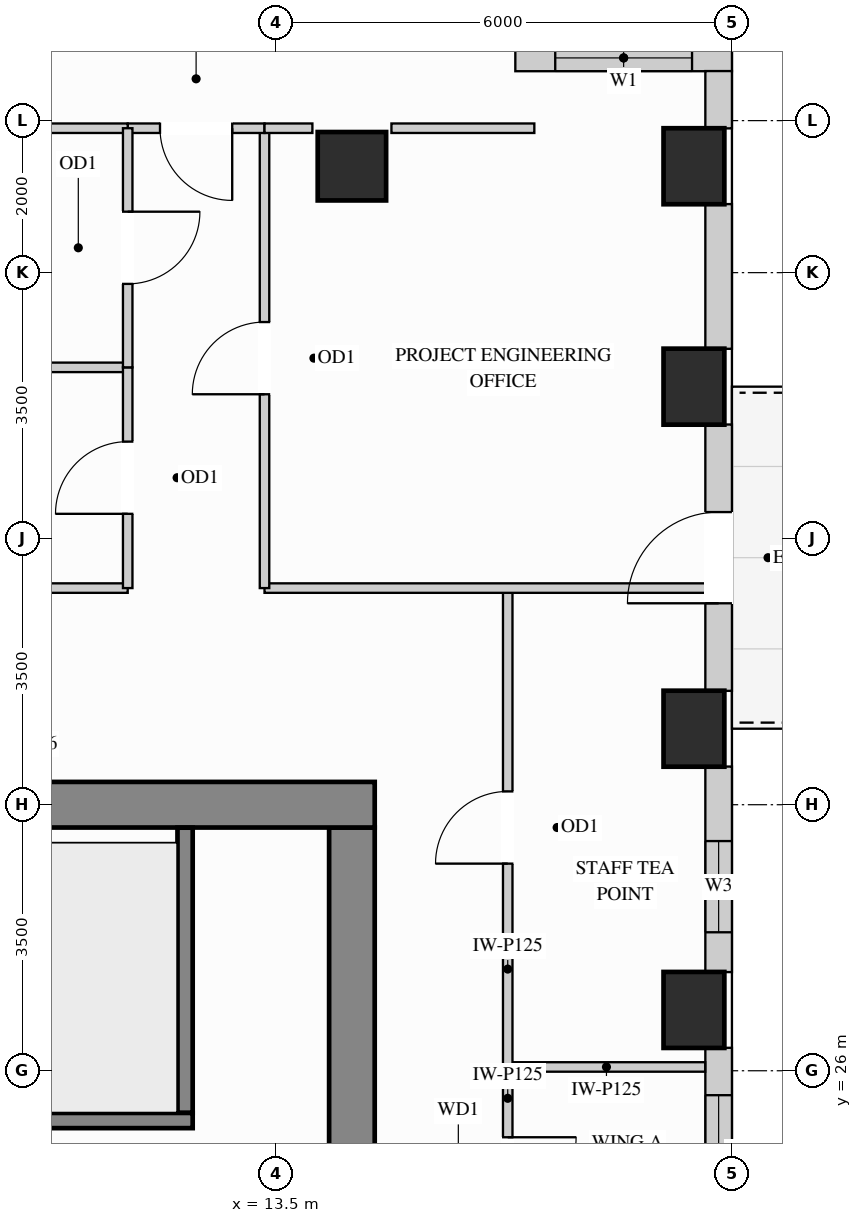
"""IFC4 building model, lengths in metres.
Left out: names, types, materials, properties, quantities, classifications, styles, units other than length and angle.
Written with IfcOpenShell. Run it as: python <this file> out.ifc"""

import sys

from ifc_helpers import new_model, si_unit, direction, frame, frame_2d, origin, origin_2d, place, context, subcontext, project, spatial, rectangle, extrude, source, transform, mapped, element, fill, save


model = new_model("IFC4")
c1 = context("Model", 3, precision=1e-05, world=origin(), true_north=direction((0.0, 1.0)))
c2 = subcontext(c1, "Body", "Model", "MODEL_VIEW")
j1 = project(units=[si_unit("LENGTHUNIT", "METRE"), si_unit("PLANEANGLEUNIT", "RADIAN")], contexts=[c1])
p1 = place(None, origin())
s1 = spatial("IfcSite", under=j1, at=p1, CompositionType="ELEMENT")
p2 = place(p1, origin())
s2 = spatial("IfcBuilding", under=s1, at=p2, CompositionType="ELEMENT")
p3 = place(p2, frame((0.0, 0.0, 171.9)))
s3 = spatial("IfcBuildingStorey", under=s2, at=p3, CompositionType="ELEMENT", Elevation=171.9)
m1 = source(origin(), c2, "Body", "SweptSolid", [
    extrude(rectangle(XDim=0.9, YDim=0.9, at=origin_2d()), origin(), (0.0, 0.0, 1.0), 3.4),
])
p4 = place(p3, frame((14.5, 37.9, 0.0), z_axis=(0.0, 0.0, 1.0), x_axis=(1.0, 0.0, 0.0)))
e1 = element("IfcColumn", 1, at=p4, inside=s3, PredefinedType="COLUMN", context=c2, shape_type="MappedRepresentation", body=[
    mapped(m1, transform((0.0, 0.0, 0.0), x_axis=(1.0, 0.0, 0.0), y_axis=(0.0, 1.0, 0.0), z_axis=(0.0, 0.0, 1.0))),
])
m2 = source(origin(), c2, "Body", "SweptSolid", [
    extrude(rectangle(XDim=0.8, YDim=1.0, at=origin_2d()), origin(), (0.0, 0.0, 1.0), 3.4),
])
for number, where, z_axis, x_axis in (
    (2, (19.0, 26.8, 0.0), (0.0, 0.0, 1.0), (1.0, 0.0, 0.0)),
    (3, (19.0, 30.5, 0.0), (0.0, 0.0, 1.0), (1.0, 0.0, 0.0)),
    (4, (19.0, 35.0, 0.0), (0.0, 0.0, 1.0), (1.0, 0.0, 0.0)),
    (5, (19.0, 37.9, 0.0), (0.0, 0.0, 1.0), (1.0, 0.0, 0.0)),
):
    element("IfcColumn", number, at=place(p3, frame(where, z_axis=z_axis, x_axis=x_axis)), inside=s3, PredefinedType="COLUMN", context=c2, shape_type="MappedRepresentation", body=[
        mapped(m2, transform((0.0, 0.0, 0.0), x_axis=(1.0, 0.0, 0.0), y_axis=(0.0, 1.0, 0.0), z_axis=(0.0, 0.0, 1.0))),
    ])
m3 = source(origin(), c2, "Body", "SweptSolid", [
    extrude(rectangle(XDim=8.32, YDim=0.6, at=frame_2d((4.16, 0.0))), origin(), (0.0, 0.0, 1.0), 3.4),
])
p5 = place(p3, frame((14.5, 20.88, 0.0), z_axis=(0.0, 0.0, 1.0), x_axis=(0.0, 1.0, 0.0)))
e6 = element("IfcWall", 6, at=p5, inside=s3, PredefinedType="SHEAR", context=c2, shape_type="MappedRepresentation", body=[
    mapped(m3, transform((0.0, 0.0, 0.0), x_axis=(1.0, 0.0, 0.0), y_axis=(0.0, 1.0, 0.0), z_axis=(0.0, 0.0, 1.0))),
])
m4 = source(origin(), c2, "Body", "SweptSolid", [
    extrude(rectangle(XDim=10.6, YDim=0.6, at=frame_2d((5.3, 0.0))), origin(), (0.0, 0.0, 1.0), 3.4),
])
p6 = place(p3, frame((4.2, 29.5, 0.0), z_axis=(0.0, 0.0, 1.0), x_axis=(1.0, 0.0, 0.0)))
e7 = element("IfcWall", 7, at=p6, inside=s3, PredefinedType="SHEAR", context=c2, shape_type="MappedRepresentation", body=[
    mapped(m4, transform((0.0, 0.0, 0.0), x_axis=(1.0, 0.0, 0.0), y_axis=(0.0, 1.0, 0.0), z_axis=(0.0, 0.0, 1.0))),
])
p7 = place(p3, frame((19.5, 39.325, 0.0), z_axis=(0.0, 0.0, 1.0), x_axis=(-1.0, 0.0, 0.0)))
e8 = element("IfcWall", 8, at=p7, inside=s3, PredefinedType="SOLIDWALL", context=c2, shape_type="SweptSolid", body=[
    extrude(rectangle(XDim=2.85, YDim=0.35, at=frame_2d((1.425, 0.0))), origin(), (0.0, 0.0, 1.0), 3.385),
])
p8 = place(p7, frame((0.525, 0.0, 0.78)))
e9 = element("IfcOpeningElement", 9, at=p8, cuts=e8, PredefinedType="OPENING", context=c2, shape_type="SweptSolid", body=[
    extrude(rectangle(XDim=1.8, YDim=2.1, at=frame_2d((0.9, 1.05))), frame((0.0, 0.185, 0.0), z_axis=(0.0, -1.0, 0.0), x_axis=(1.0, 0.0, 0.0)), (0.0, 0.0, 1.0), 0.37),
])
p9 = place(p3, frame((19.325, 22.998, 0.0), z_axis=(0.0, 0.0, 1.0), x_axis=(0.0, 1.0, 0.0)))
e10 = element("IfcWall", 10, at=p9, inside=s3, PredefinedType="SOLIDWALL", context=c2, shape_type="SweptSolid", body=[
    extrude(rectangle(XDim=3.304, YDim=0.35, at=frame_2d((1.652, 0.0))), origin(), (0.0, 0.0, 1.0), 2.612),
])
p10 = place(p9, frame((1.18, 0.0, 0.78)))
e11 = element("IfcOpeningElement", 11, at=p10, cuts=e10, PredefinedType="OPENING", context=c2, shape_type="SweptSolid", body=[
    extrude(rectangle(XDim=1.5, YDim=1.652, at=frame_2d((0.75, 0.826))), frame((0.0, 0.185, 0.0), z_axis=(0.0, -1.0, 0.0), x_axis=(1.0, 0.0, 0.0)), (0.0, 0.0, 1.0), 0.37),
])
p11 = place(p3, frame((19.325, 27.298, 0.0), z_axis=(0.0, 0.0, 1.0), x_axis=(0.0, 1.0, 0.0)))
e12 = element("IfcWall", 12, at=p11, inside=s3, PredefinedType="SOLIDWALL", context=c2, shape_type="SweptSolid", body=[
    extrude(rectangle(XDim=2.704, YDim=0.35, at=frame_2d((1.352, 0.0))), origin(), (0.0, 0.0, 1.0), 2.612),
])
p12 = place(p11, frame((0.524, 0.0, 0.78)))
e13 = element("IfcOpeningElement", 13, at=p12, cuts=e12, PredefinedType="OPENING", context=c2, shape_type="SweptSolid", body=[
    extrude(rectangle(XDim=1.2, YDim=1.652, at=frame_2d((0.6, 0.826))), frame((0.0, 0.185, 0.0), z_axis=(0.0, -1.0, 0.0), x_axis=(1.0, 0.0, 0.0)), (0.0, 0.0, 1.0), 0.37),
])
p13 = place(p3, frame((19.325, 30.998, 0.0), z_axis=(0.0, 0.0, 1.0), x_axis=(0.0, 1.0, 0.0)))
e14 = element("IfcWall", 14, at=p13, inside=s3, PredefinedType="SOLIDWALL", context=c2, shape_type="SweptSolid", body=[
    extrude(rectangle(XDim=3.504, YDim=0.35, at=frame_2d((1.752, 0.0))), origin(), (0.0, 0.0, 1.0), 2.612),
])
p14 = place(p13, frame((1.152, 0.0, 0.0)))
e15 = element("IfcOpeningElement", 15, at=p14, cuts=e14, PredefinedType="OPENING", context=c2, shape_type="SweptSolid", body=[
    extrude(rectangle(XDim=1.2, YDim=2.15, at=frame_2d((0.6, 1.075))), frame((0.0, 0.185, 0.0), z_axis=(0.0, -1.0, 0.0), x_axis=(1.0, 0.0, 0.0)), (0.0, 0.0, 1.0), 0.37),
])
m5 = source(origin(), c2, "Body", "SweptSolid", [
    extrude(rectangle(XDim=1.904, YDim=0.35, at=frame_2d((0.952, 0.0))), origin(), (0.0, 0.0, 1.0), 2.612),
])
p15 = place(p3, frame((19.325, 35.498, 0.0), z_axis=(0.0, 0.0, 1.0), x_axis=(0.0, 1.0, 0.0)))
e16 = element("IfcWall", 16, at=p15, inside=s3, PredefinedType="SOLIDWALL", context=c2, shape_type="MappedRepresentation", body=[
    mapped(m5, transform((0.0, 0.0, 0.0), x_axis=(1.0, 0.0, 0.0), y_axis=(0.0, 1.0, 0.0), z_axis=(0.0, 0.0, 1.0))),
])
m6 = source(origin(), c2, "Body", "SweptSolid", [
    extrude(rectangle(XDim=0.754, YDim=0.35, at=frame_2d((0.377, 0.0))), origin(), (0.0, 0.0, 1.0), 3.385),
])
p16 = place(p3, frame((19.325, 38.398, 0.0), z_axis=(0.0, 0.0, 1.0), x_axis=(0.0, 1.0, 0.0)))
e17 = element("IfcWall", 17, at=p16, inside=s3, PredefinedType="SOLIDWALL", context=c2, shape_type="MappedRepresentation", body=[
    mapped(m6, transform((0.0, 0.0, 0.0), x_axis=(1.0, 0.0, 0.0), y_axis=(0.0, 1.0, 0.0), z_axis=(0.0, 0.0, 1.0))),
])
m7 = source(origin(), c2, "Body", "SweptSolid", [
    extrude(rectangle(XDim=2.598, YDim=0.125, at=frame_2d((1.299, 0.0))), origin(), (0.0, 0.0, 1.0), 3.385),
])
p17 = place(p3, frame((16.55, 26.05, 0.0), z_axis=(0.0, 0.0, 1.0), x_axis=(1.0, 0.0, 0.0)))
e18 = element("IfcWall", 18, at=p17, inside=s3, PredefinedType="PARTITIONING", context=c2, shape_type="MappedRepresentation", body=[
    mapped(m7, transform((0.0, 0.0, 0.0), x_axis=(1.0, 0.0, 0.0), y_axis=(0.0, 1.0, 0.0), z_axis=(0.0, 0.0, 1.0))),
])
p18 = place(p3, frame((16.55, 26.05, 0.0), z_axis=(0.0, 0.0, 1.0), x_axis=(0.0, 1.0, 0.0)))
e19 = element("IfcWall", 19, at=p18, inside=s3, PredefinedType="PARTITIONING", context=c2, shape_type="SweptSolid", body=[
    extrude(rectangle(XDim=6.3, YDim=0.125, at=frame_2d((3.15, 0.0))), origin(), (0.0, 0.0, 1.0), 3.385),
])
p19 = place(p18, frame((2.675, 0.0, 0.0)))
e20 = element("IfcOpeningElement", 20, at=p19, cuts=e19, PredefinedType="OPENING", context=c2, shape_type="SweptSolid", body=[
    extrude(rectangle(XDim=0.95, YDim=2.15, at=frame_2d((0.475, 1.075))), frame((0.0, 0.073, 0.0), z_axis=(0.0, -1.0, 0.0), x_axis=(1.0, 0.0, 0.0)), (0.0, 0.0, 1.0), 0.145),
])
p20 = place(p3, frame((16.55, 23.35, 0.0), z_axis=(0.0, 0.0, 1.0), x_axis=(0.0, 1.0, 0.0)))
e21 = element("IfcWall", 21, at=p20, inside=s3, PredefinedType="PARTITIONING", context=c2, shape_type="SweptSolid", body=[
    extrude(rectangle(XDim=2.7, YDim=0.125, at=frame_2d((1.35, 0.0))), origin(), (0.0, 0.0, 1.0), 3.385),
])
p21 = place(p20, frame((0.875, 0.0, 0.0)))
e22 = element("IfcOpeningElement", 22, at=p21, cuts=e21, PredefinedType="OPENING", context=c2, shape_type="SweptSolid", body=[
    extrude(rectangle(XDim=0.9, YDim=2.15, at=frame_2d((0.45, 1.075))), frame((0.0, 0.073, 0.0), z_axis=(0.0, -1.0, 0.0), x_axis=(1.0, 0.0, 0.0)), (0.0, 0.0, 1.0), 0.145),
])
m8 = source(origin(), c2, "Body", "SweptSolid", [
    extrude(rectangle(XDim=5.798, YDim=0.125, at=frame_2d((2.899, 0.0))), origin(), (0.0, 0.0, 1.0), 3.385),
])
p22 = place(p3, frame((13.35, 32.35, 0.0), z_axis=(0.0, 0.0, 1.0), x_axis=(1.0, 0.0, 0.0)))
e23 = element("IfcWall", 23, at=p22, inside=s3, PredefinedType="PARTITIONING", context=c2, shape_type="MappedRepresentation", body=[
    mapped(m8, transform((0.0, 0.0, 0.0), x_axis=(1.0, 0.0, 0.0), y_axis=(0.0, 1.0, 0.0), z_axis=(0.0, 0.0, 1.0))),
])
m9 = source(origin(), c2, "Body", "SweptSolid", [
    extrude(rectangle(XDim=11.198, YDim=0.125, at=frame_2d((5.599, 0.0))), origin(), (0.0, 0.0, 1.0), 3.385),
])
p23 = place(p3, frame((0.352, 32.35, 0.0), z_axis=(0.0, 0.0, 1.0), x_axis=(1.0, 0.0, 0.0)))
e24 = element("IfcWall", 24, at=p23, inside=s3, PredefinedType="PARTITIONING", context=c2, shape_type="MappedRepresentation", body=[
    mapped(m9, transform((0.0, 0.0, 0.0), x_axis=(1.0, 0.0, 0.0), y_axis=(0.0, 1.0, 0.0), z_axis=(0.0, 0.0, 1.0))),
])
m10 = source(origin(), c2, "Body", "SweptSolid", [
    extrude(rectangle(XDim=10.43, YDim=0.125, at=frame_2d((5.215, 0.0))), origin(), (0.0, 0.0, 1.0), 3.385),
])
p24 = place(p3, frame((1.12, 35.254, 0.0), z_axis=(0.0, 0.0, 1.0), x_axis=(1.0, 0.0, 0.0)))
e25 = element("IfcWall", 25, at=p24, inside=s3, PredefinedType="PARTITIONING", context=c2, shape_type="MappedRepresentation", body=[
    mapped(m10, transform((0.0, 0.0, 0.0), x_axis=(1.0, 0.0, 0.0), y_axis=(0.0, 1.0, 0.0), z_axis=(0.0, 0.0, 1.0))),
])
p25 = place(p3, frame((13.35, 32.35, 0.0), z_axis=(0.0, 0.0, 1.0), x_axis=(0.0, 1.0, 0.0)))
e26 = element("IfcWall", 26, at=p25, inside=s3, PredefinedType="PARTITIONING", context=c2, shape_type="SweptSolid", body=[
    extrude(rectangle(XDim=6.05, YDim=0.125, at=frame_2d((3.025, 0.0))), origin(), (0.0, 0.0, 1.0), 3.385),
])
p26 = place(p25, frame((2.55, 0.0, 0.0)))
e27 = element("IfcOpeningElement", 27, at=p26, cuts=e26, PredefinedType="OPENING", context=c2, shape_type="SweptSolid", body=[
    extrude(rectangle(XDim=0.95, YDim=2.15, at=frame_2d((0.475, 1.075))), frame((0.0, 0.073, 0.0), z_axis=(0.0, -1.0, 0.0), x_axis=(1.0, 0.0, 0.0)), (0.0, 0.0, 1.0), 0.145),
])
p27 = place(p3, frame((11.55, 38.4, 0.0), z_axis=(0.0, 0.0, 1.0), x_axis=(1.0, 0.0, 0.0)))
e28 = element("IfcWall", 28, at=p27, inside=s3, PredefinedType="PARTITIONING", context=c2, shape_type="SweptSolid", body=[
    extrude(rectangle(XDim=1.8, YDim=0.125, at=frame_2d((0.9, 0.0))), origin(), (0.0, 0.0, 1.0), 3.385),
])
p28 = place(p27, frame((0.425, 0.0, 0.0)))
e29 = element("IfcOpeningElement", 29, at=p28, cuts=e28, PredefinedType="OPENING", context=c2, shape_type="SweptSolid", body=[
    extrude(rectangle(XDim=0.95, YDim=2.15, at=frame_2d((0.475, 1.075))), frame((0.0, 0.073, 0.0), z_axis=(0.0, -1.0, 0.0), x_axis=(1.0, 0.0, 0.0)), (0.0, 0.0, 1.0), 0.145),
])
m11 = source(origin(), c2, "Body", "SweptSolid", [
    extrude(rectangle(XDim=0.63, YDim=0.125, at=frame_2d((0.315, 0.0))), origin(), (0.0, 0.0, 1.0), 3.385),
])
p29 = place(p3, frame((13.35, 38.4, 0.0), z_axis=(0.0, 0.0, 1.0), x_axis=(1.0, 0.0, 0.0)))
e30 = element("IfcWall", 30, at=p29, inside=s3, PredefinedType="PARTITIONING", context=c2, shape_type="MappedRepresentation", body=[
    mapped(m11, transform((0.0, 0.0, 0.0), x_axis=(1.0, 0.0, 0.0), y_axis=(0.0, 1.0, 0.0), z_axis=(0.0, 0.0, 1.0))),
])
m12 = source(origin(), c2, "Body", "SweptSolid", [
    extrude(rectangle(XDim=1.88, YDim=0.125, at=frame_2d((0.94, 0.0))), origin(), (0.0, 0.0, 1.0), 3.385),
])
p30 = place(p3, frame((15.02, 38.4, 0.0), z_axis=(0.0, 0.0, 1.0), x_axis=(1.0, 0.0, 0.0)))
e31 = element("IfcWall", 31, at=p30, inside=s3, PredefinedType="PARTITIONING", context=c2, shape_type="MappedRepresentation", body=[
    mapped(m12, transform((0.0, 0.0, 0.0), x_axis=(1.0, 0.0, 0.0), y_axis=(0.0, 1.0, 0.0), z_axis=(0.0, 0.0, 1.0))),
])
m13 = source(origin(), c2, "Body", "SweptSolid", [
    extrude(rectangle(XDim=2.03, YDim=0.125, at=frame_2d((1.015, 0.0))), origin(), (0.0, 0.0, 1.0), 3.385),
])
p31 = place(p3, frame((9.52, 38.4, 0.0), z_axis=(0.0, 0.0, 1.0), x_axis=(1.0, 0.0, 0.0)))
e32 = element("IfcWall", 32, at=p31, inside=s3, PredefinedType="PARTITIONING", context=c2, shape_type="MappedRepresentation", body=[
    mapped(m13, transform((0.0, 0.0, 0.0), x_axis=(1.0, 0.0, 0.0), y_axis=(0.0, 1.0, 0.0), z_axis=(0.0, 0.0, 1.0))),
])
p32 = place(p3, frame((11.55, 32.35, 0.0), z_axis=(0.0, 0.0, 1.0), x_axis=(0.0, 1.0, 0.0)))
e33 = element("IfcWall", 33, at=p32, inside=s3, PredefinedType="PARTITIONING", context=c2, shape_type="SweptSolid", body=[
    extrude(rectangle(XDim=2.904, YDim=0.125, at=frame_2d((1.452, 0.0))), origin(), (0.0, 0.0, 1.0), 3.385),
])
p33 = place(p32, frame((0.977, 0.0, 0.0)))
e34 = element("IfcOpeningElement", 34, at=p33, cuts=e33, PredefinedType="OPENING", context=c2, shape_type="SweptSolid", body=[
    extrude(rectangle(XDim=0.95, YDim=2.15, at=frame_2d((0.475, 1.075))), frame((0.0, 0.073, 0.0), z_axis=(0.0, -1.0, 0.0), x_axis=(1.0, 0.0, 0.0)), (0.0, 0.0, 1.0), 0.145),
])
p34 = place(p3, frame((11.55, 35.254, 0.0), z_axis=(0.0, 0.0, 1.0), x_axis=(0.0, 1.0, 0.0)))
e35 = element("IfcWall", 35, at=p34, inside=s3, PredefinedType="PARTITIONING", context=c2, shape_type="SweptSolid", body=[
    extrude(rectangle(XDim=3.146, YDim=0.125, at=frame_2d((1.573, 0.0))), origin(), (0.0, 0.0, 1.0), 3.385),
])
p35 = place(p34, frame((1.098, 0.0, 0.0)))
e36 = element("IfcOpeningElement", 36, at=p35, cuts=e35, PredefinedType="OPENING", context=c2, shape_type="SweptSolid", body=[
    extrude(rectangle(XDim=0.95, YDim=2.15, at=frame_2d((0.475, 1.075))), frame((0.0, 0.073, 0.0), z_axis=(0.0, -1.0, 0.0), x_axis=(1.0, 0.0, 0.0)), (0.0, 0.0, 1.0), 0.145),
])
m14 = source(origin(), c2, "Body", "SweptSolid", [
    extrude(rectangle(XDim=3.753, YDim=0.2, at=frame_2d((1.876, 0.0))), origin(), (0.0, 0.0, 1.0), 3.4),
])
p36 = place(p3, frame((12.305, 25.445, 0.0), z_axis=(0.0, 0.0, 1.0), x_axis=(0.0, 1.0, 0.0)))
e37 = element("IfcWall", 37, at=p36, inside=s3, PredefinedType="SHEAR", context=c2, shape_type="MappedRepresentation", body=[
    mapped(m14, transform((0.0, 0.0, 0.0), x_axis=(1.0, 0.0, 0.0), y_axis=(0.0, 1.0, 0.0), z_axis=(0.0, 0.0, 1.0))),
])
p37 = place(p3, frame((4.802, 25.345, 0.0), z_axis=(0.0, 0.0, 1.0), x_axis=(1.0, 0.0, 0.0)))
e38 = element("IfcWall", 38, at=p37, inside=s3, PredefinedType="SHEAR", context=c2, shape_type="SweptSolid", body=[
    extrude(rectangle(XDim=7.603, YDim=0.2, at=frame_2d((3.802, 0.0))), origin(), (0.0, 0.0, 1.0), 3.4),
])
p38 = place(p37, frame((0.4, 0.0, 0.0)))
e39 = element("IfcOpeningElement", 39, at=p38, cuts=e38, PredefinedType="OPENING", context=c2, shape_type="SweptSolid", body=[
    extrude(rectangle(XDim=1.1, YDim=2.15, at=frame_2d((0.55, 1.075))), frame((0.0, 0.11, 0.0), z_axis=(0.0, -1.0, 0.0), x_axis=(1.0, 0.0, 0.0)), (0.0, 0.0, 1.0), 0.22),
])
m15 = source(origin(), c2, "Body", "SweptSolid", [
    extrude(rectangle(XDim=1.2, YDim=2.15, at=frame_2d((0.6, 1.075))), frame((0.0, 0.025, 0.0), z_axis=(0.0, -1.0, 0.0), x_axis=(1.0, 0.0, 0.0)), (0.0, 0.0, 1.0), 0.05),
])
p39 = place(p14, frame((1.2, 0.0, 0.0), z_axis=(0.0, 0.0, 1.0), x_axis=(-1.0, 0.0, 0.0)))
e40 = element("IfcDoor", 40, at=p39, inside=s3, OperationType="SINGLE_SWING_LEFT", PredefinedType="DOOR", context=c2, shape_type="MappedRepresentation", body=[
    mapped(m15, transform((0.0, 0.0, 0.0), x_axis=(1.0, 0.0, 0.0), y_axis=(0.0, 1.0, 0.0), z_axis=(0.0, 0.0, 1.0))),
])
fill(e15, e40)
m16 = source(origin(), c2, "Body", "SweptSolid", [
    extrude(rectangle(XDim=0.95, YDim=2.15, at=frame_2d((0.475, 1.075))), frame((0.0, 0.025, 0.0), z_axis=(0.0, -1.0, 0.0), x_axis=(1.0, 0.0, 0.0)), (0.0, 0.0, 1.0), 0.05),
])
p40 = place(p19, origin())
e41 = element("IfcDoor", 41, at=p40, inside=s3, OperationType="SINGLE_SWING_LEFT", PredefinedType="DOOR", context=c2, shape_type="MappedRepresentation", body=[
    mapped(m16, transform((0.0, 0.0, 0.0), x_axis=(1.0, 0.0, 0.0), y_axis=(0.0, 1.0, 0.0), z_axis=(0.0, 0.0, 1.0))),
])
fill(e20, e41)
p41 = place(p26, origin())
e42 = element("IfcDoor", 42, at=p41, inside=s3, OperationType="SINGLE_SWING_LEFT", PredefinedType="DOOR", context=c2, shape_type="MappedRepresentation", body=[
    mapped(m16, transform((0.0, 0.0, 0.0), x_axis=(1.0, 0.0, 0.0), y_axis=(0.0, 1.0, 0.0), z_axis=(0.0, 0.0, 1.0))),
])
fill(e27, e42)
p42 = place(p28, origin())
e43 = element("IfcDoor", 43, at=p42, inside=s3, OperationType="SINGLE_SWING_RIGHT", PredefinedType="DOOR", context=c2, shape_type="MappedRepresentation", body=[
    mapped(m16, transform((0.0, 0.0, 0.0), x_axis=(1.0, 0.0, 0.0), y_axis=(0.0, 1.0, 0.0), z_axis=(0.0, 0.0, 1.0))),
])
fill(e29, e43)
p43 = place(p33, origin())
e44 = element("IfcDoor", 44, at=p43, inside=s3, OperationType="SINGLE_SWING_LEFT", PredefinedType="DOOR", context=c2, shape_type="MappedRepresentation", body=[
    mapped(m16, transform((0.0, 0.0, 0.0), x_axis=(1.0, 0.0, 0.0), y_axis=(0.0, 1.0, 0.0), z_axis=(0.0, 0.0, 1.0))),
])
fill(e34, e44)
p44 = place(p35, origin())
e45 = element("IfcDoor", 45, at=p44, inside=s3, OperationType="SINGLE_SWING_RIGHT", PredefinedType="DOOR", context=c2, shape_type="MappedRepresentation", body=[
    mapped(m16, transform((0.0, 0.0, 0.0), x_axis=(1.0, 0.0, 0.0), y_axis=(0.0, 1.0, 0.0), z_axis=(0.0, 0.0, 1.0))),
])
fill(e36, e45)
m17 = source(origin(), c2, "Body", "SweptSolid", [
    extrude(rectangle(XDim=0.9, YDim=2.15, at=frame_2d((0.45, 1.075))), frame((0.0, 0.025, 0.0), z_axis=(0.0, -1.0, 0.0), x_axis=(1.0, 0.0, 0.0)), (0.0, 0.0, 1.0), 0.05),
])
p45 = place(p21, origin())
e46 = element("IfcDoor", 46, at=p45, inside=s3, OperationType="SINGLE_SWING_RIGHT", PredefinedType="DOOR", context=c2, shape_type="MappedRepresentation", body=[
    mapped(m17, transform((0.0, 0.0, 0.0), x_axis=(1.0, 0.0, 0.0), y_axis=(0.0, 1.0, 0.0), z_axis=(0.0, 0.0, 1.0))),
])
fill(e22, e46)
m18 = source(origin(), c2, "Body", "SweptSolid", [
    extrude(rectangle(XDim=1.8, YDim=2.1, at=frame_2d((0.9, 1.05))), frame((0.0, 0.03, 0.0), z_axis=(0.0, -1.0, 0.0), x_axis=(1.0, 0.0, 0.0)), (0.0, 0.0, 1.0), 0.06),
])
p46 = place(p8, origin())
e47 = element("IfcWindow", 47, at=p46, inside=s3, PartitioningType="SINGLE_PANEL", PredefinedType="WINDOW", context=c2, shape_type="MappedRepresentation", body=[
    mapped(m18, transform((0.0, 0.0, 0.0), x_axis=(1.0, 0.0, 0.0), y_axis=(0.0, 1.0, 0.0), z_axis=(0.0, 0.0, 1.0))),
])
fill(e9, e47)
m19 = source(origin(), c2, "Body", "SweptSolid", [
    extrude(rectangle(XDim=1.2, YDim=1.652, at=frame_2d((0.6, 0.826))), frame((0.0, 0.03, 0.0), z_axis=(0.0, -1.0, 0.0), x_axis=(1.0, 0.0, 0.0)), (0.0, 0.0, 1.0), 0.06),
])
p47 = place(p12, origin())
e48 = element("IfcWindow", 48, at=p47, inside=s3, PartitioningType="SINGLE_PANEL", PredefinedType="WINDOW", context=c2, shape_type="MappedRepresentation", body=[
    mapped(m19, transform((0.0, 0.0, 0.0), x_axis=(1.0, 0.0, 0.0), y_axis=(0.0, 1.0, 0.0), z_axis=(0.0, 0.0, 1.0))),
])
fill(e13, e48)
m20 = source(origin(), c2, "Body", "SweptSolid", [
    extrude(rectangle(XDim=1.5, YDim=1.652, at=frame_2d((0.75, 0.826))), frame((0.0, 0.03, 0.0), z_axis=(0.0, -1.0, 0.0), x_axis=(1.0, 0.0, 0.0)), (0.0, 0.0, 1.0), 0.06),
])
p48 = place(p10, origin())
e49 = element("IfcWindow", 49, at=p48, inside=s3, PartitioningType="SINGLE_PANEL", PredefinedType="WINDOW", context=c2, shape_type="MappedRepresentation", body=[
    mapped(m20, transform((0.0, 0.0, 0.0), x_axis=(1.0, 0.0, 0.0), y_axis=(0.0, 1.0, 0.0), z_axis=(0.0, 0.0, 1.0))),
])
fill(e11, e49)
save(model, sys.argv[1])
